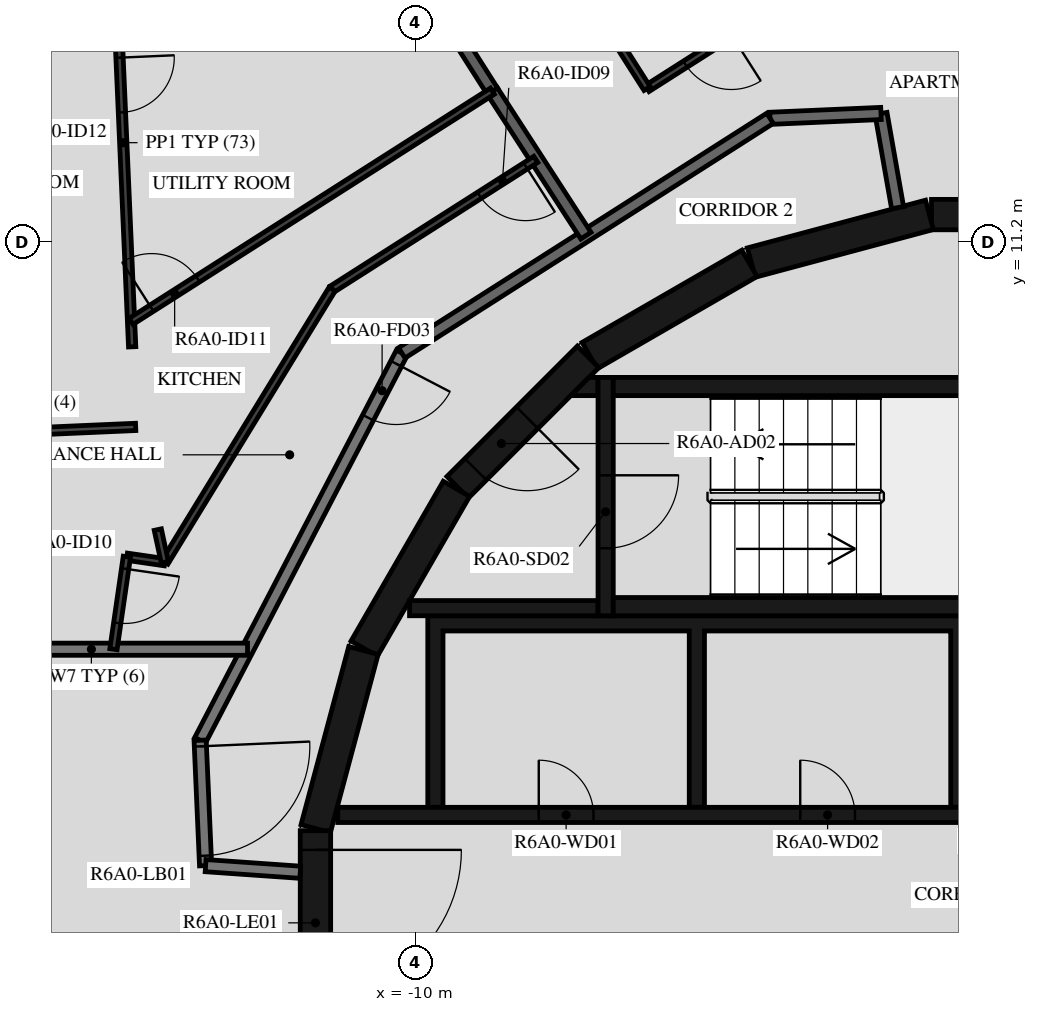
"""IFC4 building model, lengths in metres.
Left out: names, types, materials, properties, quantities, classifications, styles, units other than length and angle.
Written with IfcOpenShell. Run it as: python <this file> out.ifc"""

import sys

from ifc_helpers import new_model, si_unit, direction, frame, frame_2d, origin, place, context, subcontext, project, spatial, polyline, rectangle, outline, extrude, element, fill, save


model = new_model("IFC4")
c1 = context("Model", 3, precision=1e-05, world=origin(), true_north=direction((0.0, 1.0)))
c2 = subcontext(c1, "Body", "Model", "MODEL_VIEW")
j1 = project(units=[si_unit("LENGTHUNIT", "METRE"), si_unit("PLANEANGLEUNIT", "RADIAN")], contexts=[c1])
p1 = place(None, origin())
s1 = spatial("IfcSite", under=j1, at=p1, CompositionType="ELEMENT")
p2 = place(p1, origin())
s2 = spatial("IfcBuilding", under=s1, at=p2, CompositionType="ELEMENT")
p3 = place(p2, frame((0.0, 0.0, 226.7)))
s3 = spatial("IfcBuildingStorey", under=s2, at=p3, CompositionType="ELEMENT", Elevation=226.7)
for number, where, z_axis, x_axis in (
    (1, (1.516, 11.647, 0.0), (0.0, 0.0, 1.0), (-1.0, 0.0, 0.0)),
    (2, (-1.55, 11.643, 0.0), (0.0, 0.0, 1.0), (-0.966, -0.259, 0.0)),
    (3, (-4.51, 10.845, 0.0), (0.0, 0.0, 1.0), (-0.866, -0.5, 0.0)),
):
    element("IfcWall", number, at=place(p3, frame(where, z_axis=z_axis, x_axis=x_axis)), inside=s3, PredefinedType="SHEAR", context=c2, shape_type="SweptSolid", body=[
        extrude(rectangle(XDim=3.033, YDim=0.5, at=frame_2d((1.516, 0.0))), origin(), (0.0, 0.0, 1.0), 3.12),
    ])
p4 = place(p3, frame((-7.164, 9.308, 0.0), z_axis=(0.0, 0.0, 1.0), x_axis=(-0.707106781187, -0.707106781187, 0.0)))
e4 = element("IfcWall", 4, at=p4, inside=s3, PredefinedType="SHEAR", context=c2, shape_type="SweptSolid", body=[
    extrude(rectangle(XDim=3.032, YDim=0.5, at=frame_2d((1.516, 0.0))), origin(), (0.0, 0.0, 1.0), 3.12),
])
p5 = place(p4, frame((1.416, 0.0, 0.0)))
e5 = element("IfcOpeningElement", 5, at=p5, cuts=e4, PredefinedType="OPENING", context=c2, shape_type="SweptSolid", body=[
    extrude(rectangle(XDim=1.2, YDim=2.1, at=frame_2d((0.6, 1.05))), frame((0.0, 0.26, 0.0), z_axis=(0.0, -1.0, 0.0), x_axis=(1.0, 0.0, 0.0)), (0.0, 0.0, 1.0), 0.52),
])
for number, where, z_axis, x_axis in (
    (6, (-9.329, 7.137, 0.0), (0.0, 0.0, 1.0), (-0.5, -0.866, 0.0)),
    (7, (-10.858, 4.479, 0.0), (0.0, 0.0, 1.0), (-0.259, -0.966, 0.0)),
):
    element("IfcWall", number, at=place(p3, frame(where, z_axis=z_axis, x_axis=x_axis)), inside=s3, PredefinedType="SHEAR", context=c2, shape_type="SweptSolid", body=[
        extrude(rectangle(XDim=3.033, YDim=0.5, at=frame_2d((1.516, 0.0))), origin(), (0.0, 0.0, 1.0), 3.12),
    ])
p6 = place(p3, frame((-11.647, 1.516, 0.0), z_axis=(0.0, 0.0, 1.0), x_axis=(0.0, -1.0, 0.0)))
e8 = element("IfcWall", 8, at=p6, inside=s3, PredefinedType="SHEAR", context=c2, shape_type="SweptSolid", body=[
    extrude(rectangle(XDim=3.033, YDim=0.5, at=frame_2d((1.516, 0.0))), origin(), (0.0, 0.0, 1.0), 3.12),
])
p7 = place(p6, frame((0.316, 0.0, 0.0)))
e9 = element("IfcOpeningElement", 9, at=p7, cuts=e8, PredefinedType="OPENING", context=c2, shape_type="SweptSolid", body=[
    extrude(rectangle(XDim=2.4, YDim=2.1, at=frame_2d((1.2, 1.05))), frame((0.0, 0.26, 0.0), z_axis=(0.0, -1.0, 0.0), x_axis=(1.0, 0.0, 0.0)), (0.0, 0.0, 1.0), 0.52),
])
for number, where, z_axis, x_axis in (
    (10, (-6.75, 5.2, 0.0), (0.0, 0.0, 1.0), (1.0, 0.0, 0.0)),
    (11, (-6.75, 8.82, 0.0), (0.0, 0.0, 1.0), (1.0, 0.0, 0.0)),
):
    element("IfcWall", number, at=place(p3, frame(where, z_axis=z_axis, x_axis=x_axis)), inside=s3, PredefinedType="SHEAR", context=c2, shape_type="SweptSolid", body=[
        extrude(rectangle(XDim=6.75, YDim=0.3, at=frame_2d((3.375, 0.0))), origin(), (0.0, 0.0, 1.0), 3.12),
    ])
p8 = place(p3, frame((-6.875, 8.97, 0.0), z_axis=(0.0, 0.0, 1.0), x_axis=(0.0, -1.0, 0.0)))
e12 = element("IfcWall", 12, at=p8, inside=s3, PredefinedType="SHEAR", context=c2, shape_type="SweptSolid", body=[
    extrude(rectangle(XDim=3.92, YDim=0.25, at=frame_2d((1.96, 0.0))), origin(), (0.0, 0.0, 1.0), 3.12),
])
p9 = place(p8, frame((1.61, 0.0, 0.0)))
e13 = element("IfcOpeningElement", 13, at=p9, cuts=e12, PredefinedType="OPENING", context=c2, shape_type="SweptSolid", body=[
    extrude(rectangle(XDim=1.2, YDim=2.1, at=frame_2d((0.6, 1.05))), frame((0.0, 0.135, 0.0), z_axis=(0.0, -1.0, 0.0), x_axis=(1.0, 0.0, 0.0)), (0.0, 0.0, 1.0), 0.27),
])
p10 = place(p3, frame((-7.0, 5.175, 0.0), z_axis=(0.0, 0.0, 1.0), x_axis=(-1.0, 0.0, 0.0)))
e14 = element("IfcWall", 14, at=p10, inside=s3, PredefinedType="SHEAR", context=c2, shape_type="SweptSolid", body=[
    extrude(rectangle(XDim=3.1, YDim=0.25, at=frame_2d((1.55, 0.0))), origin(), (0.0, 0.0, 1.0), 3.12),
])
p11 = place(p3, origin())
e15 = element("IfcWall", 15, at=p11, inside=s3, PredefinedType="SHEAR", context=c2, shape_type="SweptSolid", body=[
    extrude(outline(polyline([(-7.148, 8.97), (-7.0, 8.97), (-7.0, 8.67), (-7.448, 8.67), (-7.148, 8.97)])), origin(), (0.0, 0.0, 1.0), 3.12),
])
p12 = place(p3, origin())
e16 = element("IfcWall", 16, at=p12, inside=s3, PredefinedType="SHEAR", context=c2, shape_type="SweptSolid", body=[
    extrude(outline(polyline([(-9.55, 4.8), (-5.5, 4.8), (-5.5, 1.9), (-5.25, 1.9), (-5.25, 4.8), (-1.2, 4.8), (-1.2, 1.9), (-0.95, 1.9), (-0.95, 4.8), (0.95, 4.8), (0.95, 1.9), (1.2, 1.9), (1.2, 4.8), (3.1, 4.8), (3.1, 1.9), (3.35, 1.9), (3.35, 4.8), (5.25, 4.8), (5.25, 1.9), (5.5, 1.9), (5.5, 4.8), (7.4, 4.8), (7.4, 1.9), (7.65, 1.9), (7.65, 4.8), (9.55, 4.8), (9.55, 1.9), (9.8, 1.9), (9.8, 4.8), (9.8, 5.05), (-9.8, 5.05), (-9.8, 4.8), (-9.8, 1.9), (-9.55, 1.9), (-9.55, 4.8)])), origin(), (0.0, 0.0, 1.0), 3.12),
])
p13 = place(p3, frame((-11.28, 1.775, 0.0), z_axis=(0.0, 0.0, 1.0), x_axis=(1.0, 0.0, 0.0)))
e17 = element("IfcWall", 17, at=p13, inside=s3, PredefinedType="SHEAR", context=c2, shape_type="SweptSolid", body=[
    extrude(rectangle(XDim=14.38, YDim=0.25, at=frame_2d((7.19, 0.0))), origin(), (0.0, 0.0, 1.0), 3.12),
])
p14 = place(p13, frame((10.73, 0.0, 0.0)))
e18 = element("IfcOpeningElement", 18, at=p14, cuts=e17, PredefinedType="OPENING", context=c2, shape_type="SweptSolid", body=[
    extrude(rectangle(XDim=1.1, YDim=2.1, at=frame_2d((0.55, 1.05))), frame((0.0, 0.135, 0.0), z_axis=(0.0, -1.0, 0.0), x_axis=(1.0, 0.0, 0.0)), (0.0, 0.0, 1.0), 0.27),
])
p15 = place(p13, frame((12.88, 0.0, 0.0)))
e19 = element("IfcOpeningElement", 19, at=p15, cuts=e17, PredefinedType="OPENING", context=c2, shape_type="SweptSolid", body=[
    extrude(rectangle(XDim=1.1, YDim=2.1, at=frame_2d((0.55, 1.05))), frame((0.0, 0.135, 0.0), z_axis=(0.0, -1.0, 0.0), x_axis=(1.0, 0.0, 0.0)), (0.0, 0.0, 1.0), 0.27),
])
p16 = place(p13, frame((3.305, 0.0, 0.0)))
e20 = element("IfcOpeningElement", 20, at=p16, cuts=e17, PredefinedType="OPENING", context=c2, shape_type="SweptSolid", body=[
    extrude(rectangle(XDim=0.9, YDim=2.1, at=frame_2d((0.45, 1.05))), frame((0.0, 0.135, 0.0), z_axis=(0.0, -1.0, 0.0), x_axis=(1.0, 0.0, 0.0)), (0.0, 0.0, 1.0), 0.27),
])
p17 = place(p13, frame((7.605, 0.0, 0.0)))
e21 = element("IfcOpeningElement", 21, at=p17, cuts=e17, PredefinedType="OPENING", context=c2, shape_type="SweptSolid", body=[
    extrude(rectangle(XDim=0.9, YDim=2.1, at=frame_2d((0.45, 1.05))), frame((0.0, 0.135, 0.0), z_axis=(0.0, -1.0, 0.0), x_axis=(1.0, 0.0, 0.0)), (0.0, 0.0, 1.0), 0.27),
])
p18 = place(p3, frame((-10.228, 9.372, 0.0), z_axis=(0.0, 0.0, 1.0), x_axis=(-0.461759464021, -0.887005184532, 0.0)))
e22 = element("IfcWall", 22, at=p18, inside=s3, PredefinedType="STANDARD", context=c2, shape_type="SweptSolid", body=[
    extrude(rectangle(XDim=7.181, YDim=0.2, at=frame_2d((3.591, 0.0))), origin(), (0.0, 0.0, 1.0), 3.12),
])
p19 = place(p18, frame((0.2, 0.0, 0.0)))
e23 = element("IfcOpeningElement", 23, at=p19, cuts=e22, PredefinedType="OPENING", context=c2, shape_type="SweptSolid", body=[
    extrude(rectangle(XDim=1.0, YDim=2.1, at=frame_2d((0.5, 1.05))), frame((0.0, 0.11, 0.0), z_axis=(0.0, -1.0, 0.0), x_axis=(1.0, 0.0, 0.0)), (0.0, 0.0, 1.0), 0.22),
])
p20 = place(p3, frame((-13.544, 3.003, 0.0), z_axis=(0.0, 0.0, 1.0), x_axis=(0.043652842459, -0.99904676034, 0.0)))
e24 = element("IfcWall", 24, at=p20, inside=s3, PredefinedType="STANDARD", context=c2, shape_type="SweptSolid", body=[
    extrude(rectangle(XDim=2.064, YDim=0.2, at=frame_2d((1.032, 0.0))), origin(), (0.0, 0.0, 1.0), 3.12),
])
p21 = place(p20, frame((0.1, 0.0, 0.0)))
e25 = element("IfcOpeningElement", 25, at=p21, cuts=e24, PredefinedType="OPENING", context=c2, shape_type="SweptSolid", body=[
    extrude(rectangle(XDim=1.8, YDim=2.1, at=frame_2d((0.9, 1.05))), frame((0.0, 0.11, 0.0), z_axis=(0.0, -1.0, 0.0), x_axis=(1.0, 0.0, 0.0)), (0.0, 0.0, 1.0), 0.22),
])
p22 = place(p3, frame((-13.454, 0.941, 0.0), z_axis=(0.0, 0.0, 1.0), x_axis=(0.99755155062, -0.069934997354, 0.0)))
e26 = element("IfcWall", 26, at=p22, inside=s3, PredefinedType="STANDARD", context=c2, shape_type="SweptSolid", body=[
    extrude(rectangle(XDim=1.561, YDim=0.2, at=frame_2d((0.78, 0.0))), origin(), (0.0, 0.0, 1.0), 3.12),
])
p23 = place(p3, frame((-2.074, 11.761, 0.0), z_axis=(0.0, 0.0, 1.0), x_axis=(-0.173679082312, 0.984802303189, 0.0)))
e27 = element("IfcWall", 27, at=p23, inside=s3, PredefinedType="STANDARD", context=c2, shape_type="SweptSolid", body=[
    extrude(rectangle(XDim=1.573, YDim=0.2, at=frame_2d((0.787, 0.0))), origin(), (0.0, 0.0, 1.0), 3.12),
])
p24 = place(p3, frame((-2.347, 13.31, 0.0), z_axis=(0.0, 0.0, 1.0), x_axis=(-0.999050095671, -0.043576442492, 0.0)))
e28 = element("IfcWall", 28, at=p24, inside=s3, PredefinedType="STANDARD", context=c2, shape_type="SweptSolid", body=[
    extrude(rectangle(XDim=1.826, YDim=0.2, at=frame_2d((0.913, 0.0))), origin(), (0.0, 0.0, 1.0), 3.12),
])
p25 = place(p3, frame((-4.172, 13.231, 0.0), z_axis=(0.0, 0.0, 1.0), x_axis=(-0.843388394728, -0.537304397561, 0.0)))
e29 = element("IfcWall", 29, at=p25, inside=s3, PredefinedType="STANDARD", context=c2, shape_type="SweptSolid", body=[
    extrude(rectangle(XDim=7.181, YDim=0.2, at=frame_2d((3.59, 0.0))), origin(), (0.0, 0.0, 1.0), 3.12),
])
p26 = place(p3, frame((-12.764, 4.5, 0.0), z_axis=(0.0, 0.0, 1.0), x_axis=(-1.0, 0.0, 0.0)))
e30 = element("IfcWall", 30, at=p26, inside=s3, PredefinedType="STANDARD", context=c2, shape_type="SweptSolid", body=[
    extrude(rectangle(XDim=5.135, YDim=0.2, at=frame_2d((2.568, 0.0))), origin(), (0.0, 0.0, 1.0), 3.12),
])
p27 = place(p3, frame((-8.738, 13.677, 0.0), z_axis=(0.0, 0.0, 1.0), x_axis=(0.54358037296, -0.839357121929, 0.0)))
e31 = element("IfcWall", 31, at=p27, inside=s3, PredefinedType="STANDARD", context=c2, shape_type="SweptSolid", body=[
    extrude(rectangle(XDim=2.83, YDim=0.2, at=frame_2d((1.415, 0.0))), origin(), (0.0, 0.0, 1.0), 3.12),
])
p28 = place(p3, frame((-9.663, 15.129, 0.0), z_axis=(0.0, 0.0, 1.0), x_axis=(0.537205715853, -0.843451254581, 0.0)))
e32 = element("IfcWall", 32, at=p28, inside=s3, PredefinedType="STANDARD", context=c2, shape_type="SweptSolid", body=[
    extrude(rectangle(XDim=1.722, YDim=0.2, at=frame_2d((0.861, 0.0))), origin(), (0.0, 0.0, 1.0), 3.12),
])
p29 = place(p3, frame((-4.639, 14.712, 0.0), z_axis=(0.0, 0.0, 1.0), x_axis=(-0.843361471414, -0.537346655833, 0.0)))
e33 = element("IfcWall", 33, at=p29, inside=s3, PredefinedType="PARTITIONING", context=c2, shape_type="SweptSolid", body=[
    extrude(rectangle(XDim=1.844, YDim=0.12, at=frame_2d((0.922, 0.0))), origin(), (0.0, 0.0, 1.0), 3.12),
])
p30 = place(p29, frame((0.2, 0.0, 0.0)))
e34 = element("IfcOpeningElement", 34, at=p30, cuts=e33, PredefinedType="OPENING", context=c2, shape_type="SweptSolid", body=[
    extrude(rectangle(XDim=0.9, YDim=2.1, at=frame_2d((0.45, 1.05))), frame((0.0, 0.07, 0.0), z_axis=(0.0, -1.0, 0.0), x_axis=(1.0, 0.0, 0.0)), (0.0, 0.0, 1.0), 0.14),
])
p31 = place(p3, frame((-6.194, 13.721, 0.0), z_axis=(0.0, 0.0, 1.0), x_axis=(-0.537316807294, 0.843380488629, 0.0)))
e35 = element("IfcWall", 35, at=p31, inside=s3, PredefinedType="PARTITIONING", context=c2, shape_type="SweptSolid", body=[
    extrude(rectangle(XDim=4.331, YDim=0.12, at=frame_2d((2.165, 0.0))), origin(), (0.0, 0.0, 1.0), 3.12),
])
p32 = place(p3, frame((-8.023, 12.555, 0.0), z_axis=(0.0, 0.0, 1.0), x_axis=(-0.843408270233, -0.537273198385, 0.0)))
e36 = element("IfcWall", 36, at=p32, inside=s3, PredefinedType="PARTITIONING", context=c2, shape_type="SweptSolid", body=[
    extrude(rectangle(XDim=3.971, YDim=0.12, at=frame_2d((1.986, 0.0))), origin(), (0.0, 0.0, 1.0), 3.12),
])
p33 = place(p32, frame((0.2, 0.0, 0.0)))
e37 = element("IfcOpeningElement", 37, at=p33, cuts=e36, PredefinedType="OPENING", context=c2, shape_type="SweptSolid", body=[
    extrude(rectangle(XDim=0.9, YDim=2.1, at=frame_2d((0.45, 1.05))), frame((0.0, 0.07, 0.0), z_axis=(0.0, -1.0, 0.0), x_axis=(1.0, 0.0, 0.0)), (0.0, 0.0, 1.0), 0.14),
])
p34 = place(p3, frame((-11.373, 10.421, 0.0), z_axis=(0.0, 0.0, 1.0), x_axis=(-0.522435957358, -0.852678527031, 0.0)))
e38 = element("IfcWall", 38, at=p34, inside=s3, PredefinedType="PARTITIONING", context=c2, shape_type="SweptSolid", body=[
    extrude(rectangle(XDim=5.267, YDim=0.12, at=frame_2d((2.633, 0.0))), origin(), (0.0, 0.0, 1.0), 3.12),
])
p35 = place(p3, frame((-14.125, 5.931, 0.0), z_axis=(0.0, 0.0, 1.0), x_axis=(-0.989621518838, 0.143698467119, 0.0)))
e39 = element("IfcWall", 39, at=p35, inside=s3, PredefinedType="PARTITIONING", context=c2, shape_type="SweptSolid", body=[
    extrude(rectangle(XDim=0.63, YDim=0.12, at=frame_2d((0.315, 0.0))), origin(), (0.0, 0.0, 1.0), 3.12),
])
p36 = place(p3, frame((-14.748, 6.021, 0.0), z_axis=(0.0, 0.0, 1.0), x_axis=(-0.143888945672, -0.98959384159, 0.0)))
e40 = element("IfcWall", 40, at=p36, inside=s3, PredefinedType="PARTITIONING", context=c2, shape_type="SweptSolid", body=[
    extrude(rectangle(XDim=1.537, YDim=0.12, at=frame_2d((0.769, 0.0))), origin(), (0.0, 0.0, 1.0), 3.12),
])
p37 = place(p36, frame((0.2, 0.0, 0.0)))
e41 = element("IfcOpeningElement", 41, at=p37, cuts=e40, PredefinedType="OPENING", context=c2, shape_type="SweptSolid", body=[
    extrude(rectangle(XDim=0.9, YDim=2.1, at=frame_2d((0.45, 1.05))), frame((0.0, 0.07, 0.0), z_axis=(0.0, -1.0, 0.0), x_axis=(1.0, 0.0, 0.0)), (0.0, 0.0, 1.0), 0.14),
])
p38 = place(p3, frame((-14.955, 16.187, 0.0), z_axis=(0.0, 0.0, 1.0), x_axis=(0.043591713888, -0.999049429448, 0.0)))
e42 = element("IfcWall", 42, at=p38, inside=s3, PredefinedType="PARTITIONING", context=c2, shape_type="SweptSolid", body=[
    extrude(rectangle(XDim=6.721, YDim=0.12, at=frame_2d((3.36, 0.0))), origin(), (0.0, 0.0, 1.0), 3.12),
])
p39 = place(p38, frame((1.961, 0.0, 0.0)))
e43 = element("IfcOpeningElement", 43, at=p39, cuts=e42, PredefinedType="OPENING", context=c2, shape_type="SweptSolid", body=[
    extrude(rectangle(XDim=0.9, YDim=2.1, at=frame_2d((0.45, 1.05))), frame((0.0, 0.07, 0.0), z_axis=(0.0, -1.0, 0.0), x_axis=(1.0, 0.0, 0.0)), (0.0, 0.0, 1.0), 0.14),
])
p40 = place(p3, frame((-14.68, 9.891, 0.0), z_axis=(0.0, 0.0, 1.0), x_axis=(0.843391697183, 0.537299213774, 0.0)))
e44 = element("IfcWall", 44, at=p40, inside=s3, PredefinedType="PARTITIONING", context=c2, shape_type="SweptSolid", body=[
    extrude(rectangle(XDim=7.045, YDim=0.12, at=frame_2d((3.522, 0.0))), origin(), (0.0, 0.0, 1.0), 3.12),
])
p41 = place(p40, frame((0.4, 0.0, 0.0)))
e45 = element("IfcOpeningElement", 45, at=p41, cuts=e44, PredefinedType="OPENING", context=c2, shape_type="SweptSolid", body=[
    extrude(rectangle(XDim=0.9, YDim=2.1, at=frame_2d((0.45, 1.05))), frame((0.0, 0.07, 0.0), z_axis=(0.0, -1.0, 0.0), x_axis=(1.0, 0.0, 0.0)), (0.0, 0.0, 1.0), 0.14),
])
p42 = place(p3, frame((-14.24, 6.467, 0.0), z_axis=(0.0, 0.0, 1.0), x_axis=(0.210896225868, -0.977508456186, 0.0)))
e46 = element("IfcWall", 46, at=p42, inside=s3, PredefinedType="PARTITIONING", context=c2, shape_type="SweptSolid", body=[
    extrude(rectangle(XDim=0.549, YDim=0.12, at=frame_2d((0.274, 0.0))), origin(), (0.0, 0.0, 1.0), 3.12),
])
p43 = place(p3, frame((-18.201, 7.999, 0.0), z_axis=(0.0, 0.0, 1.0), x_axis=(0.999048850974, 0.043604969534, 0.0)))
e47 = element("IfcWall", 47, at=p43, inside=s3, PredefinedType="PARTITIONING", context=c2, shape_type="SweptSolid", body=[
    extrude(rectangle(XDim=3.6, YDim=0.12, at=frame_2d((1.8, 0.0))), origin(), (0.0, 0.0, 1.0), 2.73),
])
p44 = place(p9, origin())
e48 = element("IfcDoor", 48, at=p44, inside=s3, OperationType="SINGLE_SWING_LEFT", PredefinedType="DOOR", context=c2, shape_type="SweptSolid", body=[
    extrude(rectangle(XDim=1.2, YDim=2.1, at=frame_2d((0.6, 1.05))), frame((0.0, 0.025, 0.0), z_axis=(0.0, -1.0, 0.0), x_axis=(1.0, 0.0, 0.0)), (0.0, 0.0, 1.0), 0.05),
])
fill(e13, e48)
p45 = place(p5, origin())
e49 = element("IfcDoor", 49, at=p45, inside=s3, OperationType="SINGLE_SWING_RIGHT", PredefinedType="DOOR", context=c2, shape_type="SweptSolid", body=[
    extrude(rectangle(XDim=1.2, YDim=2.1, at=frame_2d((0.6, 1.05))), frame((0.0, 0.025, 0.0), z_axis=(0.0, -1.0, 0.0), x_axis=(1.0, 0.0, 0.0)), (0.0, 0.0, 1.0), 0.05),
])
fill(e5, e49)
p46 = place(p7, origin())
e50 = element("IfcDoor", 50, at=p46, inside=s3, OperationType="DOUBLE_DOOR_SINGLE_SWING", PredefinedType="DOOR", context=c2, shape_type="SweptSolid", body=[
    extrude(rectangle(XDim=2.4, YDim=2.1, at=frame_2d((1.2, 1.05))), frame((0.0, 0.025, 0.0), z_axis=(0.0, -1.0, 0.0), x_axis=(1.0, 0.0, 0.0)), (0.0, 0.0, 1.0), 0.05),
])
fill(e9, e50)
p47 = place(p16, origin())
e51 = element("IfcDoor", 51, at=p47, inside=s3, OperationType="SINGLE_SWING_LEFT", PredefinedType="DOOR", context=c2, shape_type="SweptSolid", body=[
    extrude(rectangle(XDim=0.9, YDim=2.1, at=frame_2d((0.45, 1.05))), frame((0.0, 0.025, 0.0), z_axis=(0.0, -1.0, 0.0), x_axis=(1.0, 0.0, 0.0)), (0.0, 0.0, 1.0), 0.05),
])
fill(e20, e51)
p48 = place(p17, origin())
e52 = element("IfcDoor", 52, at=p48, inside=s3, OperationType="SINGLE_SWING_RIGHT", PredefinedType="DOOR", context=c2, shape_type="SweptSolid", body=[
    extrude(rectangle(XDim=0.9, YDim=2.1, at=frame_2d((0.45, 1.05))), frame((0.0, 0.025, 0.0), z_axis=(0.0, -1.0, 0.0), x_axis=(1.0, 0.0, 0.0)), (0.0, 0.0, 1.0), 0.05),
])
fill(e21, e52)
p49 = place(p30, origin())
e53 = element("IfcDoor", 53, at=p49, inside=s3, OperationType="SINGLE_SWING_RIGHT", PredefinedType="DOOR", context=c2, shape_type="SweptSolid", body=[
    extrude(rectangle(XDim=0.9, YDim=2.1, at=frame_2d((0.45, 1.05))), frame((0.0, 0.025, 0.0), z_axis=(0.0, -1.0, 0.0), x_axis=(1.0, 0.0, 0.0)), (0.0, 0.0, 1.0), 0.05),
])
fill(e34, e53)
p50 = place(p19, origin())
e54 = element("IfcDoor", 54, at=p50, inside=s3, OperationType="SINGLE_SWING_LEFT", PredefinedType="DOOR", context=c2, shape_type="SweptSolid", body=[
    extrude(rectangle(XDim=1.0, YDim=2.1, at=frame_2d((0.5, 1.05))), frame((0.0, 0.025, 0.0), z_axis=(0.0, -1.0, 0.0), x_axis=(1.0, 0.0, 0.0)), (0.0, 0.0, 1.0), 0.05),
])
fill(e23, e54)
p51 = place(p33, origin())
e55 = element("IfcDoor", 55, at=p51, inside=s3, OperationType="SINGLE_SWING_LEFT", PredefinedType="DOOR", context=c2, shape_type="SweptSolid", body=[
    extrude(rectangle(XDim=0.9, YDim=2.1, at=frame_2d((0.45, 1.05))), frame((0.0, 0.025, 0.0), z_axis=(0.0, -1.0, 0.0), x_axis=(1.0, 0.0, 0.0)), (0.0, 0.0, 1.0), 0.05),
])
fill(e37, e55)
p52 = place(p37, origin())
e56 = element("IfcDoor", 56, at=p52, inside=s3, OperationType="SINGLE_SWING_LEFT", PredefinedType="DOOR", context=c2, shape_type="SweptSolid", body=[
    extrude(rectangle(XDim=0.9, YDim=2.1, at=frame_2d((0.45, 1.05))), frame((0.0, 0.025, 0.0), z_axis=(0.0, -1.0, 0.0), x_axis=(1.0, 0.0, 0.0)), (0.0, 0.0, 1.0), 0.05),
])
fill(e41, e56)
p53 = place(p41, origin())
e57 = element("IfcDoor", 57, at=p53, inside=s3, OperationType="SINGLE_SWING_LEFT", PredefinedType="DOOR", context=c2, shape_type="SweptSolid", body=[
    extrude(rectangle(XDim=0.9, YDim=2.1, at=frame_2d((0.45, 1.05))), frame((0.0, 0.025, 0.0), z_axis=(0.0, -1.0, 0.0), x_axis=(1.0, 0.0, 0.0)), (0.0, 0.0, 1.0), 0.05),
])
fill(e45, e57)
p54 = place(p39, origin())
e58 = element("IfcDoor", 58, at=p54, inside=s3, OperationType="SINGLE_SWING_LEFT", PredefinedType="DOOR", context=c2, shape_type="SweptSolid", body=[
    extrude(rectangle(XDim=0.9, YDim=2.1, at=frame_2d((0.45, 1.05))), frame((0.0, 0.025, 0.0), z_axis=(0.0, -1.0, 0.0), x_axis=(1.0, 0.0, 0.0)), (0.0, 0.0, 1.0), 0.05),
])
fill(e43, e58)
p55 = place(p21, origin())
e59 = element("IfcDoor", 59, at=p55, inside=s3, OperationType="DOUBLE_DOOR_SINGLE_SWING", PredefinedType="DOOR", context=c2, shape_type="SweptSolid", body=[
    extrude(rectangle(XDim=1.8, YDim=2.1, at=frame_2d((0.9, 1.05))), frame((0.0, 0.025, 0.0), z_axis=(0.0, -1.0, 0.0), x_axis=(1.0, 0.0, 0.0)), (0.0, 0.0, 1.0), 0.05),
])
fill(e25, e59)
save(model, sys.argv[1])
